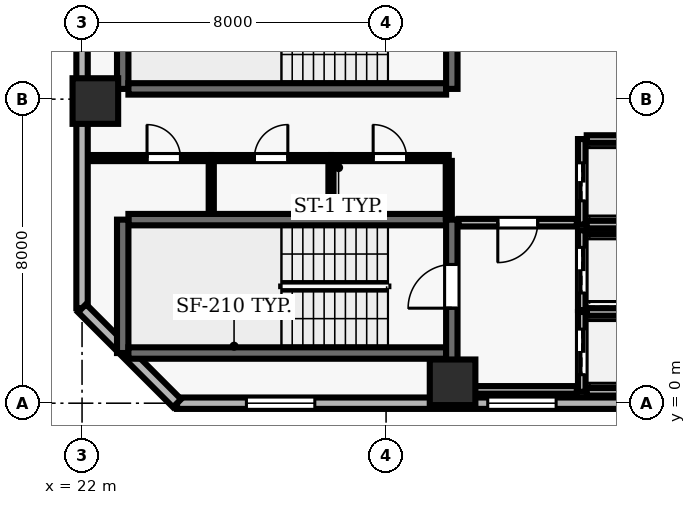
"""IFC4 building model, lengths in metres.
Left out: names, types, materials, properties, quantities, classifications, styles, units other than length and angle.
Written with IfcOpenShell. Run it as: python <this file> out.ifc"""

import sys

from ifc_helpers import new_model, si_unit, direction, frame, frame_2d, origin, origin_2d, place, context, subcontext, project, spatial, rectangle, extrude, element, fill, save


model = new_model("IFC4")
c1 = context("Model", 3, precision=1e-05, world=origin(), true_north=direction((0.0, 1.0)))
c2 = subcontext(c1, "Body", "Model", "MODEL_VIEW")
j1 = project(units=[si_unit("LENGTHUNIT", "METRE"), si_unit("PLANEANGLEUNIT", "RADIAN")], contexts=[c1])
p1 = place(None, origin())
s1 = spatial("IfcSite", under=j1, at=p1, CompositionType="ELEMENT")
p2 = place(p1, origin())
s2 = spatial("IfcBuilding", under=s1, at=p2, CompositionType="ELEMENT")
p3 = place(p2, frame((0.0, 0.0, 126.8)))
s3 = spatial("IfcBuildingStorey", under=s2, at=p3, CompositionType="ELEMENT", Elevation=126.8)
for number, where, z_axis, x_axis in (
    (1, (31.75, 0.55, 0.0), (0.0, 0.0, 1.0), (1.0, 0.0, 0.0)),
    (2, (22.35, 7.95, 0.0), (0.0, 0.0, 1.0), (1.0, 0.0, 0.0)),
):
    element("IfcColumn", number, at=place(p3, frame(where, z_axis=z_axis, x_axis=x_axis)), inside=s3, PredefinedType="COLUMN", context=c2, shape_type="SweptSolid", body=[
        extrude(rectangle(XDim=1.2, YDim=1.2, at=origin_2d()), origin(), (0.0, 0.0, 1.0), 3.9),
    ])
p4 = place(p3, frame((24.5, 0.0, 0.0), z_axis=(0.0, 0.0, 1.0), x_axis=(1.0, 0.0, 0.0)))
e3 = element("IfcWall", 3, at=p4, inside=s3, PredefinedType="SOLIDWALL", context=c2, shape_type="SweptSolid", body=[
    extrude(rectangle(XDim=43.6, YDim=0.3, at=frame_2d((21.8, 0.0))), origin(), (0.0, 0.0, 1.0), 3.69),
])
p5 = place(p4, frame((1.825, 0.0, 0.9)))
e4 = element("IfcOpeningElement", 4, at=p5, cuts=e3, PredefinedType="OPENING", context=c2, shape_type="SweptSolid", body=[
    extrude(rectangle(XDim=1.8, YDim=1.8, at=frame_2d((0.9, 0.9))), frame((0.0, 0.16, 0.0), z_axis=(0.0, -1.0, 0.0), x_axis=(1.0, 0.0, 0.0)), (0.0, 0.0, 1.0), 0.32),
])
p6 = place(p4, frame((8.175, 0.0, 0.9)))
e5 = element("IfcOpeningElement", 5, at=p6, cuts=e3, PredefinedType="OPENING", context=c2, shape_type="SweptSolid", body=[
    extrude(rectangle(XDim=1.8, YDim=1.8, at=frame_2d((0.9, 0.9))), frame((0.0, 0.16, 0.0), z_axis=(0.0, -1.0, 0.0), x_axis=(1.0, 0.0, 0.0)), (0.0, 0.0, 1.0), 0.32),
])
p7 = place(p4, frame((18.175, 0.0, 0.9)))
e6 = element("IfcOpeningElement", 6, at=p7, cuts=e3, PredefinedType="OPENING", context=c2, shape_type="SweptSolid", body=[
    extrude(rectangle(XDim=1.8, YDim=1.8, at=frame_2d((0.9, 0.9))), frame((0.0, 0.16, 0.0), z_axis=(0.0, -1.0, 0.0), x_axis=(1.0, 0.0, 0.0)), (0.0, 0.0, 1.0), 0.32),
])
p8 = place(p4, frame((24.075, 0.0, 0.9)))
e7 = element("IfcOpeningElement", 7, at=p8, cuts=e3, PredefinedType="OPENING", context=c2, shape_type="SweptSolid", body=[
    extrude(rectangle(XDim=1.8, YDim=1.8, at=frame_2d((0.9, 0.9))), frame((0.0, 0.16, 0.0), z_axis=(0.0, -1.0, 0.0), x_axis=(1.0, 0.0, 0.0)), (0.0, 0.0, 1.0), 0.32),
])
p9 = place(p4, frame((29.075, 0.0, 0.9)))
e8 = element("IfcOpeningElement", 8, at=p9, cuts=e3, PredefinedType="OPENING", context=c2, shape_type="SweptSolid", body=[
    extrude(rectangle(XDim=1.8, YDim=1.8, at=frame_2d((0.9, 0.9))), frame((0.0, 0.16, 0.0), z_axis=(0.0, -1.0, 0.0), x_axis=(1.0, 0.0, 0.0)), (0.0, 0.0, 1.0), 0.32),
])
p10 = place(p4, frame((34.525, 0.0, 0.9)))
e9 = element("IfcOpeningElement", 9, at=p10, cuts=e3, PredefinedType="OPENING", context=c2, shape_type="SweptSolid", body=[
    extrude(rectangle(XDim=1.8, YDim=1.8, at=frame_2d((0.9, 0.9))), frame((0.0, 0.16, 0.0), z_axis=(0.0, -1.0, 0.0), x_axis=(1.0, 0.0, 0.0)), (0.0, 0.0, 1.0), 0.32),
])
p11 = place(p4, frame((39.975, 0.0, 0.9)))
e10 = element("IfcOpeningElement", 10, at=p11, cuts=e3, PredefinedType="OPENING", context=c2, shape_type="SweptSolid", body=[
    extrude(rectangle(XDim=1.8, YDim=1.8, at=frame_2d((0.9, 0.9))), frame((0.0, 0.16, 0.0), z_axis=(0.0, -1.0, 0.0), x_axis=(1.0, 0.0, 0.0)), (0.0, 0.0, 1.0), 0.32),
])
p12 = place(p3, frame((22.0, 46.1, 0.0), z_axis=(0.0, 0.0, 1.0), x_axis=(0.0, -1.0, 0.0)))
e11 = element("IfcWall", 11, at=p12, inside=s3, PredefinedType="SOLIDWALL", context=c2, shape_type="SweptSolid", body=[
    extrude(rectangle(XDim=43.6, YDim=0.3, at=frame_2d((21.8, 0.0))), origin(), (0.0, 0.0, 1.0), 3.69),
])
p13 = place(p12, frame((12.7, 0.0, 0.0)))
e12 = element("IfcOpeningElement", 12, at=p13, cuts=e11, PredefinedType="OPENING", context=c2, shape_type="SweptSolid", body=[
    extrude(rectangle(XDim=1.0, YDim=2.2, at=frame_2d((0.5, 1.1))), frame((0.0, 0.16, 0.0), z_axis=(0.0, -1.0, 0.0), x_axis=(1.0, 0.0, 0.0)), (0.0, 0.0, 1.0), 0.32),
])
p14 = place(p12, frame((1.825, 0.0, 0.9)))
e13 = element("IfcOpeningElement", 13, at=p14, cuts=e11, PredefinedType="OPENING", context=c2, shape_type="SweptSolid", body=[
    extrude(rectangle(XDim=1.8, YDim=1.8, at=frame_2d((0.9, 0.9))), frame((0.0, 0.16, 0.0), z_axis=(0.0, -1.0, 0.0), x_axis=(1.0, 0.0, 0.0)), (0.0, 0.0, 1.0), 0.32),
])
p15 = place(p12, frame((6.825, 0.0, 0.9)))
e14 = element("IfcOpeningElement", 14, at=p15, cuts=e11, PredefinedType="OPENING", context=c2, shape_type="SweptSolid", body=[
    extrude(rectangle(XDim=1.8, YDim=1.8, at=frame_2d((0.9, 0.9))), frame((0.0, 0.16, 0.0), z_axis=(0.0, -1.0, 0.0), x_axis=(1.0, 0.0, 0.0)), (0.0, 0.0, 1.0), 0.32),
])
p16 = place(p12, frame((17.725, 0.0, 0.9)))
e15 = element("IfcOpeningElement", 15, at=p16, cuts=e11, PredefinedType="OPENING", context=c2, shape_type="SweptSolid", body=[
    extrude(rectangle(XDim=1.8, YDim=1.8, at=frame_2d((0.9, 0.9))), frame((0.0, 0.16, 0.0), z_axis=(0.0, -1.0, 0.0), x_axis=(1.0, 0.0, 0.0)), (0.0, 0.0, 1.0), 0.32),
])
p17 = place(p12, frame((23.625, 0.0, 0.9)))
e16 = element("IfcOpeningElement", 16, at=p17, cuts=e11, PredefinedType="OPENING", context=c2, shape_type="SweptSolid", body=[
    extrude(rectangle(XDim=1.8, YDim=1.8, at=frame_2d((0.9, 0.9))), frame((0.0, 0.16, 0.0), z_axis=(0.0, -1.0, 0.0), x_axis=(1.0, 0.0, 0.0)), (0.0, 0.0, 1.0), 0.32),
])
p18 = place(p12, frame((28.625, 0.0, 0.9)))
e17 = element("IfcOpeningElement", 17, at=p18, cuts=e11, PredefinedType="OPENING", context=c2, shape_type="SweptSolid", body=[
    extrude(rectangle(XDim=1.8, YDim=1.8, at=frame_2d((0.9, 0.9))), frame((0.0, 0.16, 0.0), z_axis=(0.0, -1.0, 0.0), x_axis=(1.0, 0.0, 0.0)), (0.0, 0.0, 1.0), 0.32),
])
p19 = place(p12, frame((34.525, 0.0, 0.9)))
e18 = element("IfcOpeningElement", 18, at=p19, cuts=e11, PredefinedType="OPENING", context=c2, shape_type="SweptSolid", body=[
    extrude(rectangle(XDim=1.8, YDim=1.8, at=frame_2d((0.9, 0.9))), frame((0.0, 0.16, 0.0), z_axis=(0.0, -1.0, 0.0), x_axis=(1.0, 0.0, 0.0)), (0.0, 0.0, 1.0), 0.32),
])
p20 = place(p3, frame((22.0, 2.5, 0.0), z_axis=(0.0, 0.0, 1.0), x_axis=(0.707106781187, -0.707106781187, 0.0)))
e19 = element("IfcWall", 19, at=p20, inside=s3, PredefinedType="SOLIDWALL", context=c2, shape_type="SweptSolid", body=[
    extrude(rectangle(XDim=3.536, YDim=0.3, at=frame_2d((1.768, 0.0))), origin(), (0.0, 0.0, 1.0), 3.69),
])
p21 = place(p3, frame((31.58, 4.83, 0.0), z_axis=(0.0, 0.0, 1.0), x_axis=(-1.0, 0.0, 0.0)))
e20 = element("IfcWall", 20, at=p21, inside=s3, PredefinedType="SHEAR", context=c2, shape_type="SweptSolid", body=[
    extrude(rectangle(XDim=8.36, YDim=0.3, at=frame_2d((4.18, 0.0))), origin(), (0.0, 0.0, 1.0), 3.69),
])
p22 = place(p3, frame((23.07, 4.83, 0.0), z_axis=(0.0, 0.0, 1.0), x_axis=(0.0, -1.0, 0.0)))
e21 = element("IfcWall", 21, at=p22, inside=s3, PredefinedType="SHEAR", context=c2, shape_type="SweptSolid", body=[
    extrude(rectangle(XDim=3.51, YDim=0.3, at=frame_2d((1.755, 0.0))), origin(), (0.0, 0.0, 1.0), 3.69),
])
p23 = place(p3, frame((23.22, 1.32, 0.0), z_axis=(0.0, 0.0, 1.0), x_axis=(1.0, 0.0, 0.0)))
e22 = element("IfcWall", 22, at=p23, inside=s3, PredefinedType="SHEAR", context=c2, shape_type="SweptSolid", body=[
    extrude(rectangle(XDim=8.36, YDim=0.3, at=frame_2d((4.18, 0.0))), origin(), (0.0, 0.0, 1.0), 3.69),
])
p24 = place(p3, frame((31.73, 0.96, 0.0), z_axis=(0.0, 0.0, 1.0), x_axis=(0.0, 1.0, 0.0)))
e23 = element("IfcWall", 23, at=p24, inside=s3, PredefinedType="SHEAR", context=c2, shape_type="SweptSolid", body=[
    extrude(rectangle(XDim=3.87, YDim=0.3, at=frame_2d((1.935, 0.0))), origin(), (0.0, 0.0, 1.0), 3.69),
])
p25 = place(p24, frame((1.54, 0.0, 0.0)))
e24 = element("IfcOpeningElement", 24, at=p25, cuts=e23, PredefinedType="OPENING", context=c2, shape_type="SweptSolid", body=[
    extrude(rectangle(XDim=1.15, YDim=2.15, at=frame_2d((0.575, 1.075))), frame((0.0, 0.16, 0.0), z_axis=(0.0, -1.0, 0.0), x_axis=(1.0, 0.0, 0.0)), (0.0, 0.0, 1.0), 0.32),
])
p26 = place(p3, frame((23.07, 11.78, 0.0), z_axis=(0.0, 0.0, 1.0), x_axis=(0.0, -1.0, 0.0)))
e25 = element("IfcWall", 25, at=p26, inside=s3, PredefinedType="SHEAR", context=c2, shape_type="SweptSolid", body=[
    extrude(rectangle(XDim=3.51, YDim=0.3, at=frame_2d((1.755, 0.0))), origin(), (0.0, 0.0, 1.0), 3.69),
])
p27 = place(p3, frame((23.22, 8.27, 0.0), z_axis=(0.0, 0.0, 1.0), x_axis=(1.0, 0.0, 0.0)))
e26 = element("IfcWall", 26, at=p27, inside=s3, PredefinedType="SHEAR", context=c2, shape_type="SweptSolid", body=[
    extrude(rectangle(XDim=8.36, YDim=0.3, at=frame_2d((4.18, 0.0))), origin(), (0.0, 0.0, 1.0), 3.69),
])
p28 = place(p3, frame((31.73, 8.27, 0.0), z_axis=(0.0, 0.0, 1.0), x_axis=(0.0, 1.0, 0.0)))
e27 = element("IfcWall", 27, at=p28, inside=s3, PredefinedType="SHEAR", context=c2, shape_type="SweptSolid", body=[
    extrude(rectangle(XDim=3.51, YDim=0.3, at=frame_2d((1.755, 0.0))), origin(), (0.0, 0.0, 1.0), 3.69),
])
p29 = place(p28, frame((1.18, 0.0, 0.0)))
e28 = element("IfcOpeningElement", 28, at=p29, cuts=e27, PredefinedType="OPENING", context=c2, shape_type="SweptSolid", body=[
    extrude(rectangle(XDim=1.15, YDim=2.15, at=frame_2d((0.575, 1.075))), frame((0.0, 0.16, 0.0), z_axis=(0.0, -1.0, 0.0), x_axis=(1.0, 0.0, 0.0)), (0.0, 0.0, 1.0), 0.32),
])
p30 = place(p3, frame((35.15, 2.4, 0.0), z_axis=(0.0, 0.0, 1.0), x_axis=(0.0, -1.0, 0.0)))
e29 = element("IfcWall", 29, at=p30, inside=s3, PredefinedType="SOLIDWALL", context=c2, shape_type="SweptSolid", body=[
    extrude(rectangle(XDim=2.1, YDim=0.2, at=frame_2d((1.05, 0.0))), origin(), (0.0, 0.0, 1.0), 3.69),
])
p31 = place(p30, frame((0.45, 0.0, 0.0)))
e30 = element("IfcOpeningElement", 30, at=p31, cuts=e29, PredefinedType="OPENING", context=c2, shape_type="SweptSolid", body=[
    extrude(rectangle(XDim=1.2, YDim=2.15, at=frame_2d((0.6, 1.075))), frame((0.0, 0.11, 0.0), z_axis=(0.0, -1.0, 0.0), x_axis=(1.0, 0.0, 0.0)), (0.0, 0.0, 1.0), 0.22),
])
for number, where, z_axis, x_axis in (
    (31, (35.28, 0.3, 0.0), (0.0, 0.0, 1.0), (1.0, 0.0, 0.0)),
    (32, (37.42, 2.4, 0.0), (0.0, 0.0, 1.0), (-1.0, 0.0, 0.0)),
):
    element("IfcWall", number, at=place(p3, frame(where, z_axis=z_axis, x_axis=x_axis)), inside=s3, PredefinedType="SOLIDWALL", context=c2, shape_type="SweptSolid", body=[
        extrude(rectangle(XDim=2.14, YDim=0.2, at=frame_2d((1.07, 0.0))), origin(), (0.0, 0.0, 1.0), 3.69),
    ])
p32 = place(p3, frame((35.15, 4.55, 0.0), z_axis=(0.0, 0.0, 1.0), x_axis=(0.0, -1.0, 0.0)))
e33 = element("IfcWall", 33, at=p32, inside=s3, PredefinedType="SOLIDWALL", context=c2, shape_type="SweptSolid", body=[
    extrude(rectangle(XDim=2.1, YDim=0.2, at=frame_2d((1.05, 0.0))), origin(), (0.0, 0.0, 1.0), 3.69),
])
p33 = place(p32, frame((0.45, 0.0, 0.0)))
e34 = element("IfcOpeningElement", 34, at=p33, cuts=e33, PredefinedType="OPENING", context=c2, shape_type="SweptSolid", body=[
    extrude(rectangle(XDim=1.2, YDim=2.15, at=frame_2d((0.6, 1.075))), frame((0.0, 0.11, 0.0), z_axis=(0.0, -1.0, 0.0), x_axis=(1.0, 0.0, 0.0)), (0.0, 0.0, 1.0), 0.22),
])
p34 = place(p3, frame((37.42, 4.55, 0.0), z_axis=(0.0, 0.0, 1.0), x_axis=(-1.0, 0.0, 0.0)))
e35 = element("IfcWall", 35, at=p34, inside=s3, PredefinedType="SOLIDWALL", context=c2, shape_type="SweptSolid", body=[
    extrude(rectangle(XDim=2.14, YDim=0.2, at=frame_2d((1.07, 0.0))), origin(), (0.0, 0.0, 1.0), 3.69),
])
p35 = place(p3, frame((35.15, 6.95, 0.0), z_axis=(0.0, 0.0, 1.0), x_axis=(0.0, -1.0, 0.0)))
e36 = element("IfcWall", 36, at=p35, inside=s3, PredefinedType="SOLIDWALL", context=c2, shape_type="SweptSolid", body=[
    extrude(rectangle(XDim=2.25, YDim=0.2, at=frame_2d((1.125, 0.0))), origin(), (0.0, 0.0, 1.0), 3.69),
])
p36 = place(p35, frame((0.625, 0.0, 0.0)))
e37 = element("IfcOpeningElement", 37, at=p36, cuts=e36, PredefinedType="OPENING", context=c2, shape_type="SweptSolid", body=[
    extrude(rectangle(XDim=1.0, YDim=2.1, at=frame_2d((0.5, 1.05))), frame((0.0, 0.11, 0.0), z_axis=(0.0, -1.0, 0.0), x_axis=(1.0, 0.0, 0.0)), (0.0, 0.0, 1.0), 0.22),
])
for number, where, z_axis, x_axis in (
    (38, (35.28, 4.7, 0.0), (0.0, 0.0, 1.0), (1.0, 0.0, 0.0)),
    (39, (37.42, 6.95, 0.0), (0.0, 0.0, 1.0), (-1.0, 0.0, 0.0)),
):
    element("IfcWall", number, at=place(p3, frame(where, z_axis=z_axis, x_axis=x_axis)), inside=s3, PredefinedType="SOLIDWALL", context=c2, shape_type="SweptSolid", body=[
        extrude(rectangle(XDim=2.14, YDim=0.2, at=frame_2d((1.07, 0.0))), origin(), (0.0, 0.0, 1.0), 3.69),
    ])
p37 = place(p3, frame((22.2, 6.45, 0.0), z_axis=(0.0, 0.0, 1.0), x_axis=(1.0, 0.0, 0.0)))
e40 = element("IfcWall", 40, at=p37, inside=s3, PredefinedType="PARTITIONING", context=c2, shape_type="SweptSolid", body=[
    extrude(rectangle(XDim=3.2, YDim=0.16, at=frame_2d((1.6, 0.0))), origin(), (0.0, 0.0, 1.0), 3.69),
])
p38 = place(p37, frame((1.51, 0.0, 0.0)))
e41 = element("IfcOpeningElement", 41, at=p38, cuts=e40, PredefinedType="OPENING", context=c2, shape_type="SweptSolid", body=[
    extrude(rectangle(XDim=0.88, YDim=2.1, at=frame_2d((0.44, 1.05))), frame((0.0, 0.09, 0.0), z_axis=(0.0, -1.0, 0.0), x_axis=(1.0, 0.0, 0.0)), (0.0, 0.0, 1.0), 0.18),
])
p39 = place(p3, frame((25.4, 6.45, 0.0), z_axis=(0.0, 0.0, 1.0), x_axis=(1.0, 0.0, 0.0)))
e42 = element("IfcWall", 42, at=p39, inside=s3, PredefinedType="PARTITIONING", context=c2, shape_type="SweptSolid", body=[
    extrude(rectangle(XDim=3.15, YDim=0.16, at=frame_2d((1.575, 0.0))), origin(), (0.0, 0.0, 1.0), 3.69),
])
p40 = place(p39, frame((1.135, 0.0, 0.0)))
e43 = element("IfcOpeningElement", 43, at=p40, cuts=e42, PredefinedType="OPENING", context=c2, shape_type="SweptSolid", body=[
    extrude(rectangle(XDim=0.88, YDim=2.1, at=frame_2d((0.44, 1.05))), frame((0.0, 0.09, 0.0), z_axis=(0.0, -1.0, 0.0), x_axis=(1.0, 0.0, 0.0)), (0.0, 0.0, 1.0), 0.18),
])
p41 = place(p3, frame((28.55, 6.45, 0.0), z_axis=(0.0, 0.0, 1.0), x_axis=(1.0, 0.0, 0.0)))
e44 = element("IfcWall", 44, at=p41, inside=s3, PredefinedType="PARTITIONING", context=c2, shape_type="SweptSolid", body=[
    extrude(rectangle(XDim=3.1, YDim=0.16, at=frame_2d((1.55, 0.0))), origin(), (0.0, 0.0, 1.0), 3.69),
])
p42 = place(p41, frame((1.11, 0.0, 0.0)))
e45 = element("IfcOpeningElement", 45, at=p42, cuts=e44, PredefinedType="OPENING", context=c2, shape_type="SweptSolid", body=[
    extrude(rectangle(XDim=0.88, YDim=2.1, at=frame_2d((0.44, 1.05))), frame((0.0, 0.09, 0.0), z_axis=(0.0, -1.0, 0.0), x_axis=(1.0, 0.0, 0.0)), (0.0, 0.0, 1.0), 0.18),
])
p43 = place(p3, frame((31.65, 0.35, 0.0), z_axis=(0.0, 0.0, 1.0), x_axis=(1.0, 0.0, 0.0)))
e46 = element("IfcWall", 46, at=p43, inside=s3, PredefinedType="SOLIDWALL", context=c2, shape_type="SweptSolid", body=[
    extrude(rectangle(XDim=3.37, YDim=0.2, at=frame_2d((1.685, 0.0))), origin(), (0.0, 0.0, 1.0), 3.69),
])
p44 = place(p3, frame((35.02, 4.75, 0.0), z_axis=(0.0, 0.0, 1.0), x_axis=(-1.0, 0.0, 0.0)))
e47 = element("IfcWall", 47, at=p44, inside=s3, PredefinedType="SOLIDWALL", context=c2, shape_type="SweptSolid", body=[
    extrude(rectangle(XDim=3.11, YDim=0.2, at=frame_2d((1.555, 0.0))), origin(), (0.0, 0.0, 1.0), 3.69),
])
p45 = place(p44, frame((1.03, 0.0, 0.0)))
e48 = element("IfcOpeningElement", 48, at=p45, cuts=e47, PredefinedType="OPENING", context=c2, shape_type="SweptSolid", body=[
    extrude(rectangle(XDim=1.05, YDim=2.15, at=frame_2d((0.525, 1.075))), frame((0.0, 0.11, 0.0), z_axis=(0.0, -1.0, 0.0), x_axis=(1.0, 0.0, 0.0)), (0.0, 0.0, 1.0), 0.22),
])
for number, where, z_axis, x_axis in (
    (49, (25.4, 5.01, 0.0), (0.0, 0.0, 1.0), (0.0, 1.0, 0.0)),
    (50, (28.55, 5.01, 0.0), (0.0, 0.0, 1.0), (0.0, 1.0, 0.0)),
):
    element("IfcWall", number, at=place(p3, frame(where, z_axis=z_axis, x_axis=x_axis)), inside=s3, PredefinedType="PARTITIONING", context=c2, shape_type="SweptSolid", body=[
        extrude(rectangle(XDim=1.365, YDim=0.135, at=frame_2d((0.683, 0.0))), origin(), (0.0, 0.0, 1.0), 3.69),
    ])
p46 = place(p3, frame((31.65, 4.86, 0.0), z_axis=(0.0, 0.0, 1.0), x_axis=(0.0, 1.0, 0.0)))
e51 = element("IfcWall", 51, at=p46, inside=s3, PredefinedType="PARTITIONING", context=c2, shape_type="SweptSolid", body=[
    extrude(rectangle(XDim=1.515, YDim=0.16, at=frame_2d((0.757, 0.0))), origin(), (0.0, 0.0, 1.0), 3.69),
])
p47 = place(p5, origin())
e52 = element("IfcWindow", 52, at=p47, inside=s3, PartitioningType="SINGLE_PANEL", PredefinedType="WINDOW", context=c2, shape_type="SweptSolid", body=[
    extrude(rectangle(XDim=1.8, YDim=1.8, at=frame_2d((0.9, 0.9))), frame((0.0, 0.03, 0.0), z_axis=(0.0, -1.0, 0.0), x_axis=(1.0, 0.0, 0.0)), (0.0, 0.0, 1.0), 0.06),
])
fill(e4, e52)
p48 = place(p6, origin())
e53 = element("IfcWindow", 53, at=p48, inside=s3, PartitioningType="SINGLE_PANEL", PredefinedType="WINDOW", context=c2, shape_type="SweptSolid", body=[
    extrude(rectangle(XDim=1.8, YDim=1.8, at=frame_2d((0.9, 0.9))), frame((0.0, 0.03, 0.0), z_axis=(0.0, -1.0, 0.0), x_axis=(1.0, 0.0, 0.0)), (0.0, 0.0, 1.0), 0.06),
])
fill(e5, e53)
p49 = place(p25, origin())
e54 = element("IfcDoor", 54, at=p49, inside=s3, OperationType="SINGLE_SWING_LEFT", PredefinedType="DOOR", context=c2, shape_type="SweptSolid", body=[
    extrude(rectangle(XDim=1.15, YDim=2.15, at=frame_2d((0.575, 1.075))), frame((0.0, 0.025, 0.0), z_axis=(0.0, -1.0, 0.0), x_axis=(1.0, 0.0, 0.0)), (0.0, 0.0, 1.0), 0.05),
])
fill(e24, e54)
p50 = place(p31, origin())
e55 = element("IfcDoor", 55, at=p50, inside=s3, OperationType="DOUBLE_DOOR_SLIDING", PredefinedType="DOOR", context=c2, shape_type="SweptSolid", body=[
    extrude(rectangle(XDim=1.2, YDim=2.15, at=frame_2d((0.6, 1.075))), frame((0.0, 0.025, 0.0), z_axis=(0.0, -1.0, 0.0), x_axis=(1.0, 0.0, 0.0)), (0.0, 0.0, 1.0), 0.05),
])
fill(e30, e55)
p51 = place(p33, origin())
e56 = element("IfcDoor", 56, at=p51, inside=s3, OperationType="DOUBLE_DOOR_SLIDING", PredefinedType="DOOR", context=c2, shape_type="SweptSolid", body=[
    extrude(rectangle(XDim=1.2, YDim=2.15, at=frame_2d((0.6, 1.075))), frame((0.0, 0.025, 0.0), z_axis=(0.0, -1.0, 0.0), x_axis=(1.0, 0.0, 0.0)), (0.0, 0.0, 1.0), 0.05),
])
fill(e34, e56)
p52 = place(p36, origin())
e57 = element("IfcDoor", 57, at=p52, inside=s3, OperationType="DOUBLE_DOOR_SLIDING", PredefinedType="DOOR", context=c2, shape_type="SweptSolid", body=[
    extrude(rectangle(XDim=1.0, YDim=2.1, at=frame_2d((0.5, 1.05))), frame((0.0, 0.025, 0.0), z_axis=(0.0, -1.0, 0.0), x_axis=(1.0, 0.0, 0.0)), (0.0, 0.0, 1.0), 0.05),
])
fill(e37, e57)
p53 = place(p45, origin())
e58 = element("IfcDoor", 58, at=p53, inside=s3, OperationType="SINGLE_SWING_RIGHT", PredefinedType="DOOR", context=c2, shape_type="SweptSolid", body=[
    extrude(rectangle(XDim=1.05, YDim=2.15, at=frame_2d((0.525, 1.075))), frame((0.0, 0.025, 0.0), z_axis=(0.0, -1.0, 0.0), x_axis=(1.0, 0.0, 0.0)), (0.0, 0.0, 1.0), 0.05),
])
fill(e48, e58)
p54 = place(p38, origin())
e59 = element("IfcDoor", 59, at=p54, inside=s3, OperationType="SINGLE_SWING_LEFT", PredefinedType="DOOR", context=c2, shape_type="SweptSolid", body=[
    extrude(rectangle(XDim=0.88, YDim=2.1, at=frame_2d((0.44, 1.05))), frame((0.0, 0.025, 0.0), z_axis=(0.0, -1.0, 0.0), x_axis=(1.0, 0.0, 0.0)), (0.0, 0.0, 1.0), 0.05),
])
fill(e41, e59)
p55 = place(p40, origin())
e60 = element("IfcDoor", 60, at=p55, inside=s3, OperationType="SINGLE_SWING_RIGHT", PredefinedType="DOOR", context=c2, shape_type="SweptSolid", body=[
    extrude(rectangle(XDim=0.88, YDim=2.1, at=frame_2d((0.44, 1.05))), frame((0.0, 0.025, 0.0), z_axis=(0.0, -1.0, 0.0), x_axis=(1.0, 0.0, 0.0)), (0.0, 0.0, 1.0), 0.05),
])
fill(e43, e60)
p56 = place(p42, origin())
e61 = element("IfcDoor", 61, at=p56, inside=s3, OperationType="SINGLE_SWING_LEFT", PredefinedType="DOOR", context=c2, shape_type="SweptSolid", body=[
    extrude(rectangle(XDim=0.88, YDim=2.1, at=frame_2d((0.44, 1.05))), frame((0.0, 0.025, 0.0), z_axis=(0.0, -1.0, 0.0), x_axis=(1.0, 0.0, 0.0)), (0.0, 0.0, 1.0), 0.05),
])
fill(e45, e61)
save(model, sys.argv[1])
